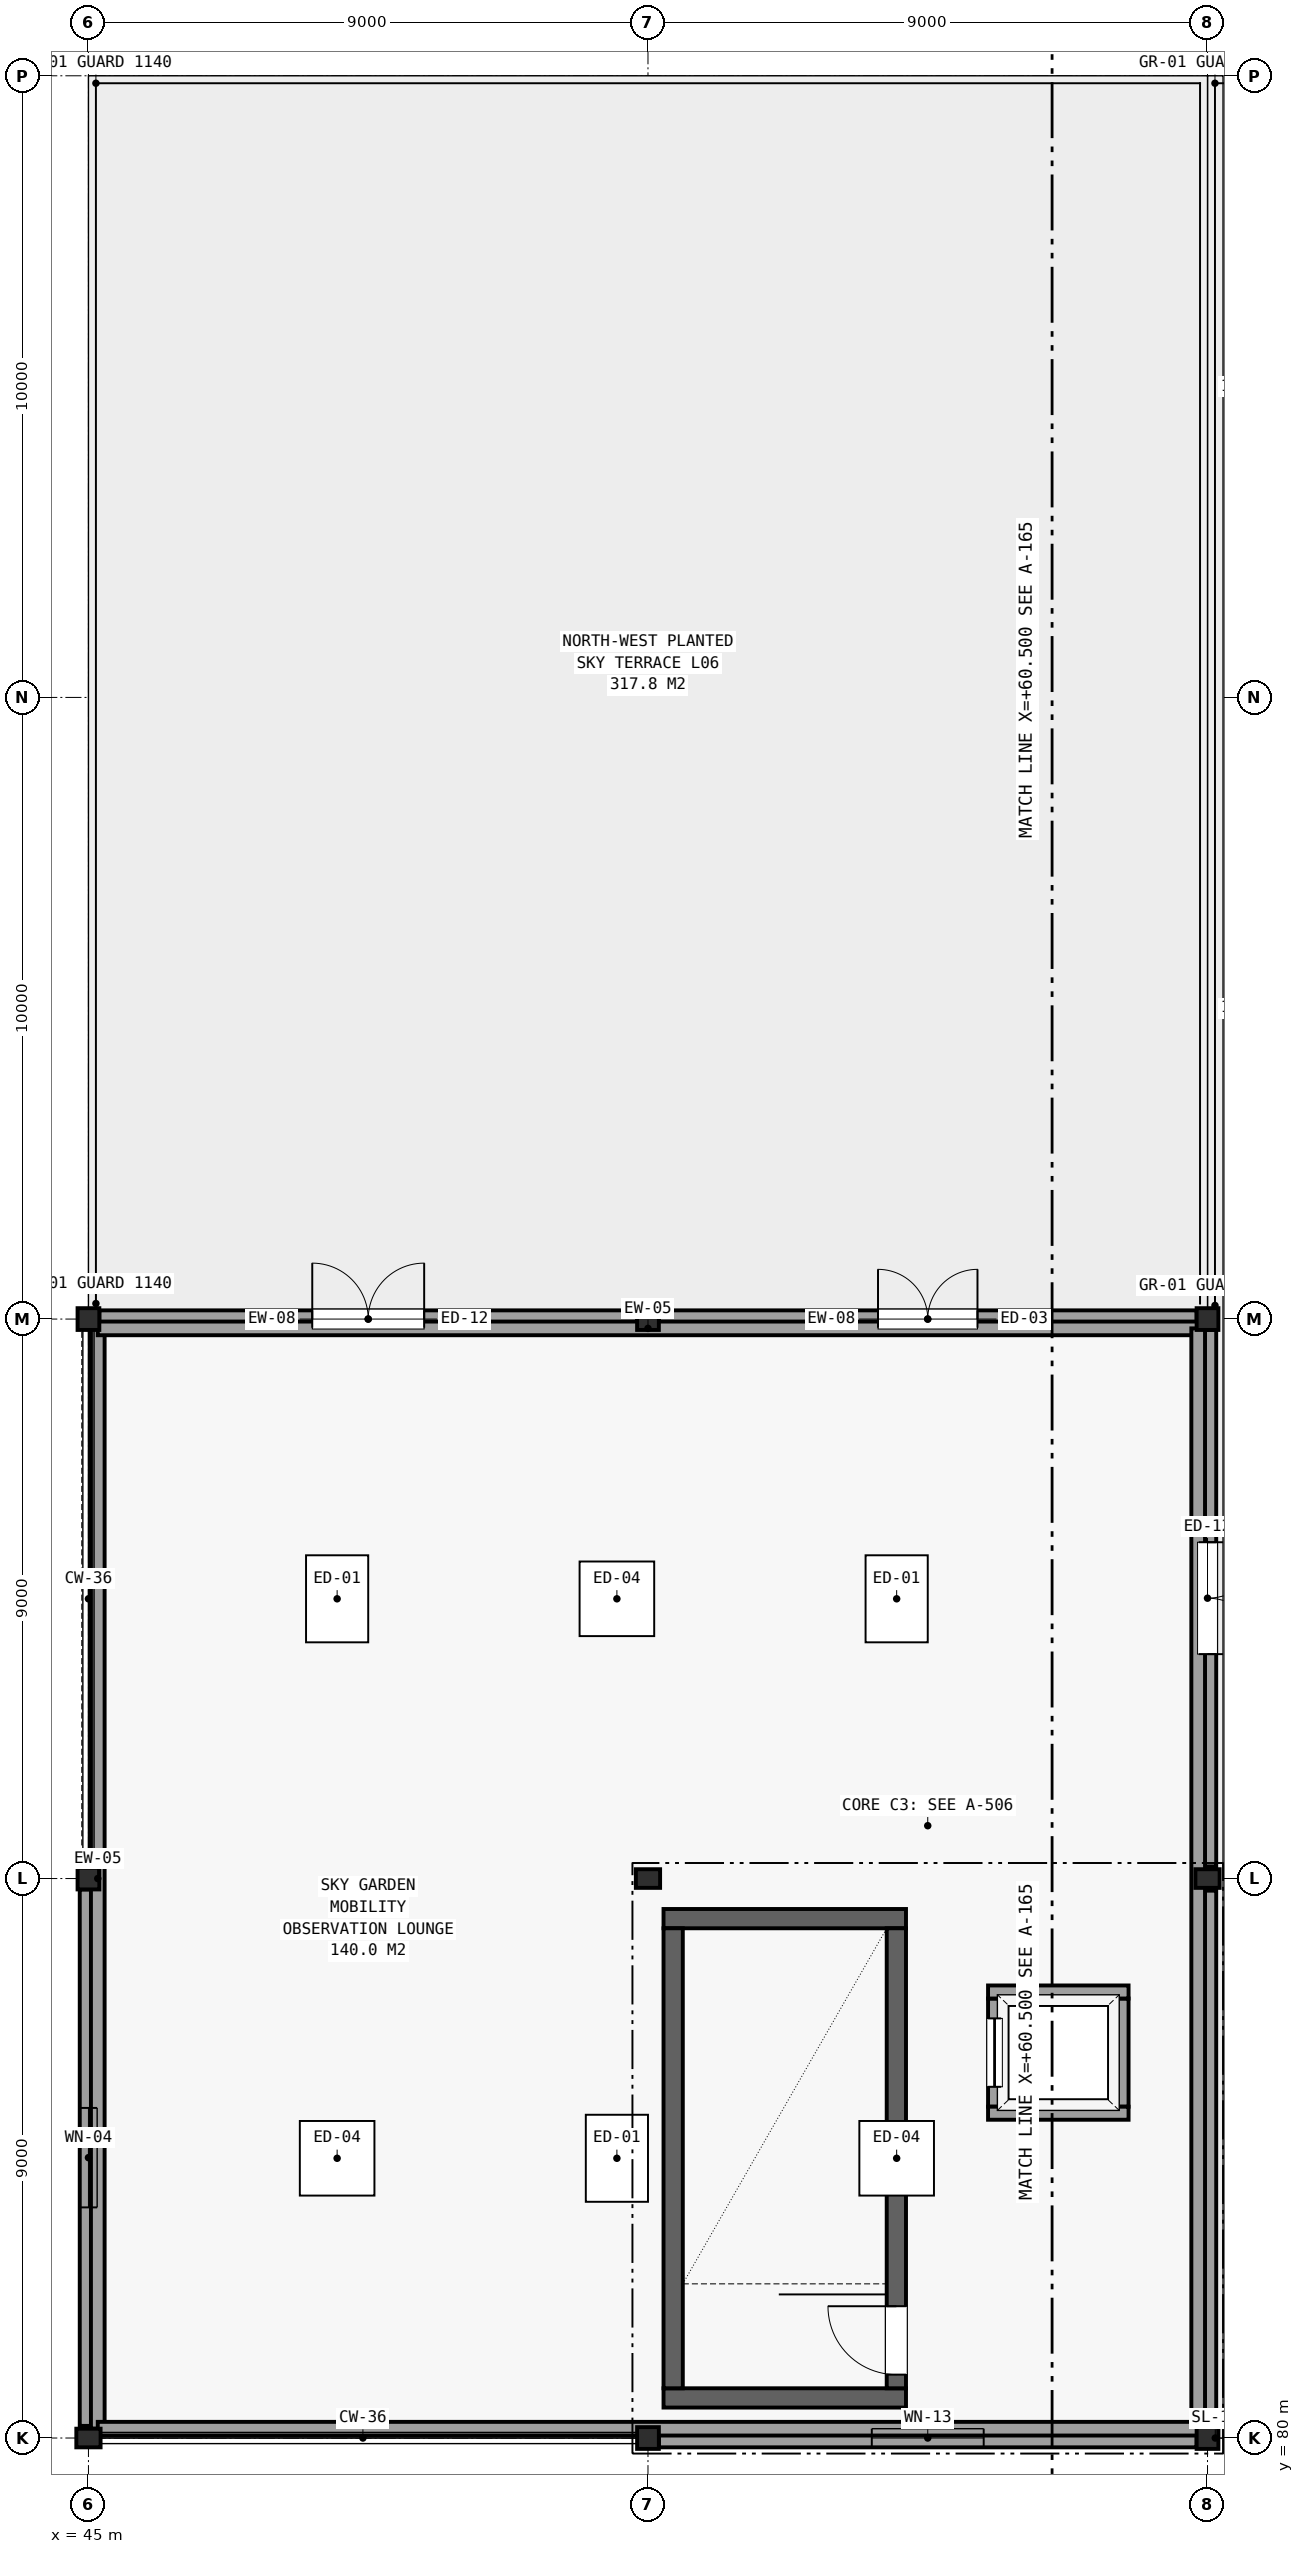
"""IFC4 building model, lengths in metres.
Left out: names, types, materials, properties, quantities, classifications, styles, units other than length and angle.
Written with IfcOpenShell. Run it as: python <this file> out.ifc"""

import sys

from ifc_helpers import new_model, si_unit, direction, frame, frame_2d, origin, origin_2d, place, context, subcontext, project, spatial, rectangle, hollow_rectangle, i_section, extrude, element, fill, save


model = new_model("IFC4")
c1 = context("Model", 3, precision=1e-05, world=origin(), true_north=direction((0.0, 1.0)))
c2 = subcontext(c1, "Body", "Model", "MODEL_VIEW")
j1 = project(units=[si_unit("LENGTHUNIT", "METRE"), si_unit("PLANEANGLEUNIT", "RADIAN")], contexts=[c1])
p1 = place(None, origin())
s1 = spatial("IfcSite", under=j1, at=p1, CompositionType="ELEMENT")
p2 = place(p1, origin())
s2 = spatial("IfcBuilding", under=s1, at=p2, CompositionType="ELEMENT")
p3 = place(p2, frame((0.0, 0.0, 26.1)))
s3 = spatial("IfcBuildingStorey", under=s2, at=p3, CompositionType="ELEMENT", Elevation=26.1)
p4 = place(p3, frame((45.0, 80.0, 0.0), z_axis=(0.0, 0.0, 1.0), x_axis=(1.0, 0.0, 0.0)))
e1 = element("IfcColumn", 1, at=p4, inside=s3, PredefinedType="COLUMN", context=c2, shape_type="SweptSolid", body=[
    extrude(i_section(OverallWidth=0.3, OverallDepth=0.39, WebThickness=0.01, FlangeThickness=0.016, FilletRadius=0.013, at=origin_2d()), origin(), (0.0, 0.0, 1.0), 4.14),
])
for number, where, z_axis, x_axis in (
    (2, (45.0, 89.0, 0.0), (0.0, 0.0, 1.0), (1.0, 0.0, 0.0)),
    (3, (45.0, 98.0, 0.0), (0.0, 0.0, 1.0), (1.0, 0.0, 0.0)),
    (4, (54.0, 80.0, 0.0), (0.0, 0.0, 1.0), (1.0, 0.0, 0.0)),
):
    element("IfcColumn", number, at=place(p3, frame(where, z_axis=z_axis, x_axis=x_axis)), inside=s3, PredefinedType="COLUMN", context=c2, shape_type="SweptSolid", body=[
        extrude(hollow_rectangle(XDim=0.35, YDim=0.35, WallThickness=0.016, at=origin_2d()), origin(), (0.0, 0.0, 1.0), 4.14),
    ])
p5 = place(p3, frame((54.0, 89.0, 0.0), z_axis=(0.0, 0.0, 1.0), x_axis=(1.0, 0.0, 0.0)))
e5 = element("IfcColumn", 5, at=p5, inside=s3, PredefinedType="COLUMN", context=c2, shape_type="SweptSolid", body=[
    extrude(i_section(OverallWidth=0.3, OverallDepth=0.39, WebThickness=0.01, FlangeThickness=0.016, FilletRadius=0.013, at=origin_2d()), origin(), (0.0, 0.0, 1.0), 4.14),
])
for number, where, z_axis, x_axis in (
    (6, (54.0, 98.0, 0.0), (0.0, 0.0, 1.0), (1.0, 0.0, 0.0)),
    (7, (63.0, 80.0, 0.0), (0.0, 0.0, 1.0), (1.0, 0.0, 0.0)),
):
    element("IfcColumn", number, at=place(p3, frame(where, z_axis=z_axis, x_axis=x_axis)), inside=s3, PredefinedType="COLUMN", context=c2, shape_type="SweptSolid", body=[
        extrude(hollow_rectangle(XDim=0.35, YDim=0.35, WallThickness=0.016, at=origin_2d()), origin(), (0.0, 0.0, 1.0), 4.14),
    ])
p6 = place(p3, frame((63.0, 89.0, 0.0), z_axis=(0.0, 0.0, 1.0), x_axis=(1.0, 0.0, 0.0)))
e8 = element("IfcColumn", 8, at=p6, inside=s3, PredefinedType="COLUMN", context=c2, shape_type="SweptSolid", body=[
    extrude(i_section(OverallWidth=0.3, OverallDepth=0.39, WebThickness=0.01, FlangeThickness=0.016, FilletRadius=0.013, at=origin_2d()), origin(), (0.0, 0.0, 1.0), 4.14),
])
p7 = place(p3, frame((63.0, 98.0, 0.0), z_axis=(0.0, 0.0, 1.0), x_axis=(1.0, 0.0, 0.0)))
e9 = element("IfcColumn", 9, at=p7, inside=s3, PredefinedType="COLUMN", context=c2, shape_type="SweptSolid", body=[
    extrude(hollow_rectangle(XDim=0.35, YDim=0.35, WallThickness=0.016, at=origin_2d()), origin(), (0.0, 0.0, 1.0), 4.14),
])
p8 = place(p3, frame((54.175, 80.0, 0.0), z_axis=(0.0, 0.0, 1.0), x_axis=(1.0, 0.0, 0.0)))
e10 = element("IfcWall", 10, at=p8, inside=s3, PredefinedType="SOLIDWALL", context=c2, shape_type="SweptSolid", body=[
    extrude(rectangle(XDim=8.65, YDim=0.3, at=frame_2d((4.325, 0.0))), origin(), (0.0, 0.0, 1.0), 3.94),
])
p9 = place(p8, frame((3.425, 0.0, 0.95)))
e11 = element("IfcOpeningElement", 11, at=p9, cuts=e10, PredefinedType="OPENING", context=c2, shape_type="SweptSolid", body=[
    extrude(rectangle(XDim=1.8, YDim=2.2, at=frame_2d((0.9, 1.1))), frame((0.0, 0.161, 0.0), z_axis=(0.0, -1.0, 0.0), x_axis=(1.0, 0.0, 0.0)), (0.0, 0.0, 1.0), 0.322),
])
p10 = place(p3, frame((63.0, 80.175, 0.0), z_axis=(0.0, 0.0, 1.0), x_axis=(0.0, 1.0, 0.0)))
e12 = element("IfcWall", 12, at=p10, inside=s3, PredefinedType="SOLIDWALL", context=c2, shape_type="SweptSolid", body=[
    extrude(rectangle(XDim=8.63, YDim=0.28, at=frame_2d((4.315, 0.0))), origin(), (0.0, 0.0, 1.0), 3.94),
])
p11 = place(p3, frame((63.0, 89.195, 0.0), z_axis=(0.0, 0.0, 1.0), x_axis=(0.0, 1.0, 0.0)))
e13 = element("IfcWall", 13, at=p11, inside=s3, PredefinedType="SOLIDWALL", context=c2, shape_type="SweptSolid", body=[
    extrude(rectangle(XDim=8.63, YDim=0.28, at=frame_2d((4.315, 0.0))), origin(), (0.0, 0.0, 1.0), 3.94),
])
p12 = place(p11, frame((5.215, 0.0, 0.0), z_axis=(0.0, 0.0, 1.0), x_axis=(-1.0, 0.0, 0.0)))
e14 = element("IfcOpeningElement", 14, at=p12, cuts=e13, PredefinedType="OPENING", context=c2, shape_type="SweptSolid", body=[
    extrude(rectangle(XDim=1.8, YDim=2.2, at=frame_2d((0.9, 1.1))), frame((0.0, 0.151, 0.0), z_axis=(0.0, -1.0, 0.0), x_axis=(1.0, 0.0, 0.0)), (0.0, 0.0, 1.0), 0.302),
])
p13 = place(p3, frame((62.825, 98.0, 0.0), z_axis=(0.0, 0.0, 1.0), x_axis=(-1.0, 0.0, 0.0)))
e15 = element("IfcWall", 15, at=p13, inside=s3, PredefinedType="SOLIDWALL", context=c2, shape_type="SweptSolid", body=[
    extrude(rectangle(XDim=8.65, YDim=0.28, at=frame_2d((4.325, 0.0))), origin(), (0.0, 0.0, 1.0), 3.94),
])
p14 = place(p13, frame((5.125, 0.0, 0.0), z_axis=(0.0, 0.0, 1.0), x_axis=(-1.0, 0.0, 0.0)))
e16 = element("IfcOpeningElement", 16, at=p14, cuts=e15, PredefinedType="OPENING", context=c2, shape_type="SweptSolid", body=[
    extrude(rectangle(XDim=1.6, YDim=2.2, at=frame_2d((0.8, 1.1))), frame((0.0, 0.151, 0.0), z_axis=(0.0, -1.0, 0.0), x_axis=(1.0, 0.0, 0.0)), (0.0, 0.0, 1.0), 0.302),
])
p15 = place(p3, frame((53.825, 98.0, 0.0), z_axis=(0.0, 0.0, 1.0), x_axis=(-1.0, 0.0, 0.0)))
e17 = element("IfcWall", 17, at=p15, inside=s3, PredefinedType="SOLIDWALL", context=c2, shape_type="SweptSolid", body=[
    extrude(rectangle(XDim=8.65, YDim=0.28, at=frame_2d((4.325, 0.0))), origin(), (0.0, 0.0, 1.0), 3.94),
])
p16 = place(p15, frame((5.225, 0.0, 0.0), z_axis=(0.0, 0.0, 1.0), x_axis=(-1.0, 0.0, 0.0)))
e18 = element("IfcOpeningElement", 18, at=p16, cuts=e17, PredefinedType="OPENING", context=c2, shape_type="SweptSolid", body=[
    extrude(rectangle(XDim=1.8, YDim=2.2, at=frame_2d((0.9, 1.1))), frame((0.0, 0.151, 0.0), z_axis=(0.0, -1.0, 0.0), x_axis=(1.0, 0.0, 0.0)), (0.0, 0.0, 1.0), 0.302),
])
p17 = place(p3, frame((45.0, 88.825, 0.0), z_axis=(0.0, 0.0, 1.0), x_axis=(0.0, -1.0, 0.0)))
e19 = element("IfcWall", 19, at=p17, inside=s3, PredefinedType="SOLIDWALL", context=c2, shape_type="SweptSolid", body=[
    extrude(rectangle(XDim=8.63, YDim=0.28, at=frame_2d((4.315, 0.0))), origin(), (0.0, 0.0, 1.0), 3.94),
])
p18 = place(p17, frame((3.515, 0.0, 0.95)))
e20 = element("IfcOpeningElement", 20, at=p18, cuts=e19, PredefinedType="OPENING", context=c2, shape_type="SweptSolid", body=[
    extrude(rectangle(XDim=1.6, YDim=2.1, at=frame_2d((0.8, 1.05))), frame((0.0, 0.151, 0.0), z_axis=(0.0, -1.0, 0.0), x_axis=(1.0, 0.0, 0.0)), (0.0, 0.0, 1.0), 0.302),
])
for number, where, z_axis, x_axis in (
    (21, (45.15, 80.15, 4.2), (0.0, 0.0, 1.0), (0.0, 1.0, 0.0)),
    (22, (45.15, 97.85, 4.2), (0.0, 0.0, 1.0), (1.0, 0.0, 0.0)),
    (23, (62.85, 97.85, 4.2), (0.0, 0.0, 1.0), (0.0, -1.0, 0.0)),
    (24, (62.85, 80.15, 4.2), (0.0, 0.0, 1.0), (-1.0, 0.0, 0.0)),
):
    element("IfcWall", number, at=place(p3, frame(where, z_axis=z_axis, x_axis=x_axis)), inside=s3, PredefinedType="PARAPET", context=c2, shape_type="SweptSolid", body=[
        extrude(rectangle(XDim=17.7, YDim=0.22, at=frame_2d((8.85, 0.0))), origin(), (0.0, 0.0, 1.0), 0.52),
    ])
for number, where, z_axis, x_axis in (
    (25, (54.25, 80.645, 0.0), (0.0, 0.0, 1.0), (1.0, 0.0, 0.0)),
    (26, (54.25, 88.355, 0.0), (0.0, 0.0, 1.0), (1.0, 0.0, 0.0)),
):
    element("IfcWall", number, at=place(p3, frame(where, z_axis=z_axis, x_axis=x_axis)), inside=s3, PredefinedType="SHEAR", context=c2, shape_type="SweptSolid", body=[
        extrude(rectangle(XDim=3.9, YDim=0.31, at=frame_2d((1.95, 0.0))), origin(), (0.0, 0.0, 1.0), 3.94),
    ])
p19 = place(p3, frame((54.405, 80.8, 0.0), z_axis=(0.0, 0.0, 1.0), x_axis=(0.0, 1.0, 0.0)))
e27 = element("IfcWall", 27, at=p19, inside=s3, PredefinedType="SHEAR", context=c2, shape_type="SweptSolid", body=[
    extrude(rectangle(XDim=7.4, YDim=0.31, at=frame_2d((3.7, 0.0))), origin(), (0.0, 0.0, 1.0), 3.94),
])
p20 = place(p3, frame((57.995, 80.8, 0.0), z_axis=(0.0, 0.0, 1.0), x_axis=(0.0, 1.0, 0.0)))
e28 = element("IfcWall", 28, at=p20, inside=s3, PredefinedType="SHEAR", context=c2, shape_type="SweptSolid", body=[
    extrude(rectangle(XDim=7.4, YDim=0.31, at=frame_2d((3.7, 0.0))), origin(), (0.0, 0.0, 1.0), 3.94),
])
p21 = place(p20, frame((0.22, 0.0, 0.0)))
e29 = element("IfcOpeningElement", 29, at=p21, cuts=e28, PredefinedType="OPENING", context=c2, shape_type="SweptSolid", body=[
    extrude(rectangle(XDim=1.1, YDim=2.15, at=frame_2d((0.55, 1.075))), frame((0.0, 0.166, 0.0), z_axis=(0.0, -1.0, 0.0), x_axis=(1.0, 0.0, 0.0)), (0.0, 0.0, 1.0), 0.332),
])
p22 = place(p3, frame((59.575, 85.33, 0.0), z_axis=(0.0, 0.0, 1.0), x_axis=(0.0, 1.0, 0.0)))
e30 = element("IfcWall", 30, at=p22, inside=s3, PredefinedType="PARTITIONING", context=c2, shape_type="SweptSolid", body=[
    extrude(rectangle(XDim=1.74, YDim=0.21, at=frame_2d((0.87, 0.0))), origin(), (0.0, 0.0, 1.0), 3.94),
])
p23 = place(p22, frame((0.32, 0.0, 0.0)))
e31 = element("IfcOpeningElement", 31, at=p23, cuts=e30, PredefinedType="OPENING", context=c2, shape_type="SweptSolid", body=[
    extrude(rectangle(XDim=1.1, YDim=2.15, at=frame_2d((0.55, 1.075))), frame((0.0, 0.116, 0.0), z_axis=(0.0, -1.0, 0.0), x_axis=(1.0, 0.0, 0.0)), (0.0, 0.0, 1.0), 0.232),
])
p24 = place(p3, frame((61.625, 85.33, 0.0), z_axis=(0.0, 0.0, 1.0), x_axis=(0.0, 1.0, 0.0)))
e32 = element("IfcWall", 32, at=p24, inside=s3, PredefinedType="PARTITIONING", context=c2, shape_type="SweptSolid", body=[
    extrude(rectangle(XDim=1.74, YDim=0.21, at=frame_2d((0.87, 0.0))), origin(), (0.0, 0.0, 1.0), 3.94),
])
for number, where, z_axis, x_axis in (
    (33, (59.47, 85.225, 0.0), (0.0, 0.0, 1.0), (1.0, 0.0, 0.0)),
    (34, (59.47, 87.175, 0.0), (0.0, 0.0, 1.0), (1.0, 0.0, 0.0)),
):
    element("IfcWall", number, at=place(p3, frame(where, z_axis=z_axis, x_axis=x_axis)), inside=s3, PredefinedType="PARTITIONING", context=c2, shape_type="SweptSolid", body=[
        extrude(rectangle(XDim=2.26, YDim=0.21, at=frame_2d((1.13, 0.0))), origin(), (0.0, 0.0, 1.0), 3.94),
    ])
p25 = place(p9, origin())
e35 = element("IfcWindow", 35, at=p25, inside=s3, PartitioningType="SINGLE_PANEL", PredefinedType="WINDOW", context=c2, shape_type="SweptSolid", body=[
    extrude(rectangle(XDim=1.8, YDim=2.2, at=frame_2d((0.9, 1.1))), frame((0.0, 0.03, 0.0), z_axis=(0.0, -1.0, 0.0), x_axis=(1.0, 0.0, 0.0)), (0.0, 0.0, 1.0), 0.06),
])
fill(e11, e35)
p26 = place(p12, origin())
e36 = element("IfcDoor", 36, at=p26, inside=s3, OperationType="SINGLE_SWING_LEFT", PredefinedType="DOOR", context=c2, shape_type="SweptSolid", body=[
    extrude(rectangle(XDim=1.8, YDim=2.2, at=frame_2d((0.9, 1.1))), frame((0.0, 0.025, 0.0), z_axis=(0.0, -1.0, 0.0), x_axis=(1.0, 0.0, 0.0)), (0.0, 0.0, 1.0), 0.05),
])
fill(e14, e36)
p27 = place(p14, origin())
e37 = element("IfcDoor", 37, at=p27, inside=s3, OperationType="SINGLE_SWING_LEFT", PredefinedType="DOOR", context=c2, shape_type="SweptSolid", body=[
    extrude(rectangle(XDim=1.6, YDim=2.2, at=frame_2d((0.8, 1.1))), frame((0.0, 0.025, 0.0), z_axis=(0.0, -1.0, 0.0), x_axis=(1.0, 0.0, 0.0)), (0.0, 0.0, 1.0), 0.05),
])
fill(e16, e37)
p28 = place(p16, origin())
e38 = element("IfcDoor", 38, at=p28, inside=s3, OperationType="SINGLE_SWING_LEFT", PredefinedType="DOOR", context=c2, shape_type="SweptSolid", body=[
    extrude(rectangle(XDim=1.8, YDim=2.2, at=frame_2d((0.9, 1.1))), frame((0.0, 0.025, 0.0), z_axis=(0.0, -1.0, 0.0), x_axis=(1.0, 0.0, 0.0)), (0.0, 0.0, 1.0), 0.05),
])
fill(e18, e38)
p29 = place(p18, origin())
e39 = element("IfcWindow", 39, at=p29, inside=s3, PartitioningType="SINGLE_PANEL", PredefinedType="WINDOW", context=c2, shape_type="SweptSolid", body=[
    extrude(rectangle(XDim=1.6, YDim=2.1, at=frame_2d((0.8, 1.05))), frame((0.0, 0.03, 0.0), z_axis=(0.0, -1.0, 0.0), x_axis=(1.0, 0.0, 0.0)), (0.0, 0.0, 1.0), 0.06),
])
fill(e20, e39)
p30 = place(p2, frame((0.0, 0.0, 30.3)))
p31 = place(p30, frame((0.0, 0.0, -0.26)))
p32 = place(p31, frame((49.0, 84.5, -0.011)))
p33 = place(p32, frame((0.0, 0.0, 0.221)))
e40 = element("IfcDoor", 40, at=p33, inside=s3, OperationType="SINGLE_SWING_LEFT", PredefinedType="TRAPDOOR", context=c2, shape_type="SweptSolid", body=[
    extrude(rectangle(XDim=1.2, YDim=1.2, at=origin_2d()), origin(), (0.0, 0.0, 1.0), 0.05),
])
p34 = place(p31, frame((53.5, 84.5, -0.011)))
p35 = place(p34, frame((0.0, 0.0, 0.221)))
e41 = element("IfcDoor", 41, at=p35, inside=s3, OperationType="SINGLE_SWING_LEFT", PredefinedType="TRAPDOOR", context=c2, shape_type="SweptSolid", body=[
    extrude(rectangle(XDim=1.0, YDim=1.4, at=origin_2d()), origin(), (0.0, 0.0, 1.0), 0.05),
])
p36 = place(p31, frame((58.0, 84.5, -0.011)))
p37 = place(p36, frame((0.0, 0.0, 0.221)))
e42 = element("IfcDoor", 42, at=p37, inside=s3, OperationType="SINGLE_SWING_LEFT", PredefinedType="TRAPDOOR", context=c2, shape_type="SweptSolid", body=[
    extrude(rectangle(XDim=1.2, YDim=1.2, at=origin_2d()), origin(), (0.0, 0.0, 1.0), 0.05),
])
p38 = place(p31, frame((49.0, 93.5, -0.011)))
p39 = place(p38, frame((0.0, 0.0, 0.221)))
e43 = element("IfcDoor", 43, at=p39, inside=s3, OperationType="SINGLE_SWING_LEFT", PredefinedType="TRAPDOOR", context=c2, shape_type="SweptSolid", body=[
    extrude(rectangle(XDim=1.0, YDim=1.4, at=origin_2d()), origin(), (0.0, 0.0, 1.0), 0.05),
])
p40 = place(p31, frame((53.5, 93.5, -0.011)))
p41 = place(p40, frame((0.0, 0.0, 0.221)))
e44 = element("IfcDoor", 44, at=p41, inside=s3, OperationType="SINGLE_SWING_LEFT", PredefinedType="TRAPDOOR", context=c2, shape_type="SweptSolid", body=[
    extrude(rectangle(XDim=1.2, YDim=1.2, at=origin_2d()), origin(), (0.0, 0.0, 1.0), 0.05),
])
p42 = place(p31, frame((58.0, 93.5, -0.011)))
p43 = place(p42, frame((0.0, 0.0, 0.221)))
e45 = element("IfcDoor", 45, at=p43, inside=s3, OperationType="SINGLE_SWING_LEFT", PredefinedType="TRAPDOOR", context=c2, shape_type="SweptSolid", body=[
    extrude(rectangle(XDim=1.0, YDim=1.4, at=origin_2d()), origin(), (0.0, 0.0, 1.0), 0.05),
])
p44 = place(p21, origin())
e46 = element("IfcDoor", 46, at=p44, inside=s3, OperationType="SINGLE_SWING_RIGHT", PredefinedType="DOOR", context=c2, shape_type="SweptSolid", body=[
    extrude(rectangle(XDim=1.1, YDim=2.15, at=frame_2d((0.55, 1.075))), frame((0.0, 0.025, 0.0), z_axis=(0.0, -1.0, 0.0), x_axis=(1.0, 0.0, 0.0)), (0.0, 0.0, 1.0), 0.05),
])
fill(e29, e46)
p45 = place(p23, origin())
e47 = element("IfcDoor", 47, at=p45, inside=s3, OperationType="SLIDING_TO_LEFT", PredefinedType="DOOR", context=c2, shape_type="SweptSolid", body=[
    extrude(rectangle(XDim=1.1, YDim=2.15, at=frame_2d((0.55, 1.075))), frame((0.0, 0.025, 0.0), z_axis=(0.0, -1.0, 0.0), x_axis=(1.0, 0.0, 0.0)), (0.0, 0.0, 1.0), 0.05),
])
fill(e31, e47)
save(model, sys.argv[1])
